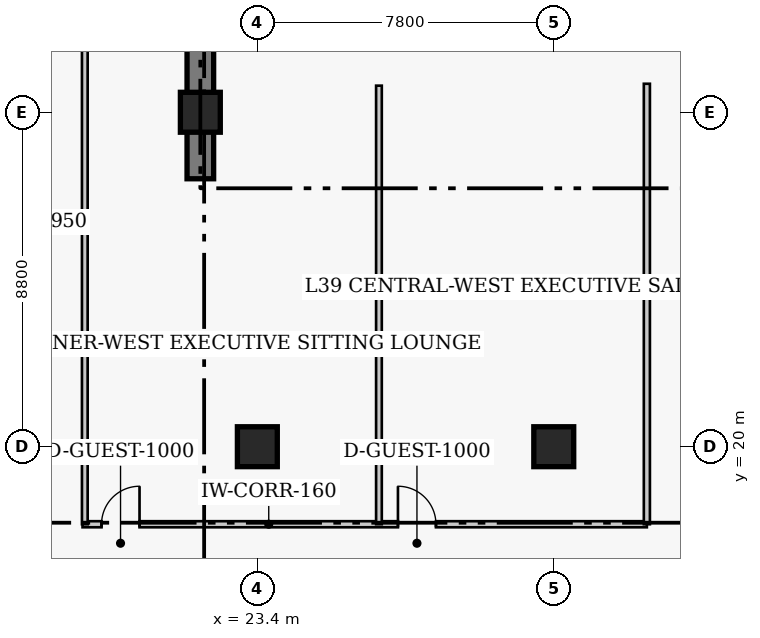
"""IFC4 building model, lengths in metres.
Left out: names, types, materials, properties, quantities, classifications, styles, units other than length and angle.
Written with IfcOpenShell. Run it as: python <this file> out.ifc"""

import sys

from ifc_helpers import new_model, si_unit, direction, frame, frame_2d, origin, origin_2d, place, context, subcontext, project, spatial, rectangle, extrude, element, fill, save


model = new_model("IFC4")
c1 = context("Model", 3, precision=1e-05, world=origin(), true_north=direction((0.0, 1.0)))
c2 = subcontext(c1, "Body", "Model", "MODEL_VIEW")
j1 = project(units=[si_unit("LENGTHUNIT", "METRE"), si_unit("PLANEANGLEUNIT", "RADIAN")], contexts=[c1])
p1 = place(None, origin())
s1 = spatial("IfcSite", under=j1, at=p1, CompositionType="ELEMENT")
p2 = place(p1, origin())
s2 = spatial("IfcBuilding", under=s1, at=p2, CompositionType="ELEMENT")
p3 = place(p2, frame((0.0, 0.0, 157.4)))
s3 = spatial("IfcBuildingStorey", under=s2, at=p3, CompositionType="ELEMENT", Elevation=157.4)
p4 = place(p3, frame((21.9, 27.05, 0.0), z_axis=(0.0, 0.0, 1.0), x_axis=(0.0, 1.0, 0.0)))
e1 = element("IfcWall", 1, at=p4, inside=s3, PredefinedType="SHEAR", context=c2, shape_type="SweptSolid", body=[
    extrude(rectangle(XDim=13.62, YDim=0.7, at=frame_2d((6.81, 0.0))), origin(), (0.0, 0.0, 1.0), 3.8),
])
for number, where, z_axis, x_axis in (
    (2, (23.4, 20.0, 0.0), (0.0, 0.0, 1.0), (1.0, 0.0, 0.0)),
    (3, (31.2, 20.0, 0.0), (0.0, 0.0, 1.0), (1.0, 0.0, 0.0)),
    (4, (21.9, 28.8, 0.0), (0.0, 0.0, 1.0), (1.0, 0.0, 0.0)),
):
    element("IfcColumn", number, at=place(p3, frame(where, z_axis=z_axis, x_axis=x_axis)), inside=s3, PredefinedType="COLUMN", context=c2, shape_type="SweptSolid", body=[
        extrude(rectangle(XDim=1.05, YDim=1.05, at=origin_2d()), origin(), (0.0, 0.0, 1.0), 3.8),
    ])
p5 = place(p3, frame((18.8, 17.96, 0.0), z_axis=(0.0, 0.0, 1.0), x_axis=(1.0, 0.0, 0.0)))
e5 = element("IfcWall", 5, at=p5, inside=s3, PredefinedType="PARTITIONING", context=c2, shape_type="SweptSolid", body=[
    extrude(rectangle(XDim=14.85, YDim=0.16, at=frame_2d((7.425, 0.0))), origin(), (0.0, 0.0, 1.0), 3.55),
])
p6 = place(p5, frame((0.5, 0.0, 0.0)))
e6 = element("IfcOpeningElement", 6, at=p6, cuts=e5, PredefinedType="OPENING", context=c2, shape_type="SweptSolid", body=[
    extrude(rectangle(XDim=1.0, YDim=2.15, at=frame_2d((0.5, 1.075))), frame((0.0, 0.09, 0.0), z_axis=(0.0, -1.0, 0.0), x_axis=(1.0, 0.0, 0.0)), (0.0, 0.0, 1.0), 0.18),
])
p7 = place(p5, frame((8.3, 0.0, 0.0)))
e7 = element("IfcOpeningElement", 7, at=p7, cuts=e5, PredefinedType="OPENING", context=c2, shape_type="SweptSolid", body=[
    extrude(rectangle(XDim=1.0, YDim=2.15, at=frame_2d((0.5, 1.075))), frame((0.0, 0.09, 0.0), z_axis=(0.0, -1.0, 0.0), x_axis=(1.0, 0.0, 0.0)), (0.0, 0.0, 1.0), 0.18),
])
p8 = place(p3, frame((33.65, 17.96, 0.0), z_axis=(0.0, 0.0, 1.0), x_axis=(0.0, 1.0, 0.0)))
e8 = element("IfcWall", 8, at=p8, inside=s3, PredefinedType="PARTITIONING", context=c2, shape_type="SweptSolid", body=[
    extrude(rectangle(XDim=11.59, YDim=0.16, at=frame_2d((5.795, 0.0))), origin(), (0.0, 0.0, 1.0), 3.55),
])
p9 = place(p3, frame((18.86, 17.96, 0.0), z_axis=(0.0, 0.0, 1.0), x_axis=(0.0, 1.0, 0.0)))
e9 = element("IfcWall", 9, at=p9, inside=s3, PredefinedType="PARTITIONING", context=c2, shape_type="SweptSolid", body=[
    extrude(rectangle(XDim=14.84, YDim=0.15, at=frame_2d((7.42, 0.0))), origin(), (0.0, 0.0, 1.0), 3.55),
])
p10 = place(p3, frame((26.6, 17.96, 0.0), z_axis=(0.0, 0.0, 1.0), x_axis=(0.0, 1.0, 0.0)))
e10 = element("IfcWall", 10, at=p10, inside=s3, PredefinedType="PARTITIONING", context=c2, shape_type="SweptSolid", body=[
    extrude(rectangle(XDim=11.54, YDim=0.15, at=frame_2d((5.77, 0.0))), origin(), (0.0, 0.0, 1.0), 3.55),
])
p11 = place(p6, origin())
e11 = element("IfcDoor", 11, at=p11, inside=s3, OperationType="SINGLE_SWING_RIGHT", PredefinedType="DOOR", context=c2, shape_type="SweptSolid", body=[
    extrude(rectangle(XDim=1.0, YDim=2.15, at=frame_2d((0.5, 1.075))), frame((0.0, 0.025, 0.0), z_axis=(0.0, -1.0, 0.0), x_axis=(1.0, 0.0, 0.0)), (0.0, 0.0, 1.0), 0.05),
])
fill(e6, e11)
p12 = place(p7, origin())
e12 = element("IfcDoor", 12, at=p12, inside=s3, OperationType="SINGLE_SWING_LEFT", PredefinedType="DOOR", context=c2, shape_type="SweptSolid", body=[
    extrude(rectangle(XDim=1.0, YDim=2.15, at=frame_2d((0.5, 1.075))), frame((0.0, 0.025, 0.0), z_axis=(0.0, -1.0, 0.0), x_axis=(1.0, 0.0, 0.0)), (0.0, 0.0, 1.0), 0.05),
])
fill(e7, e12)
save(model, sys.argv[1])
